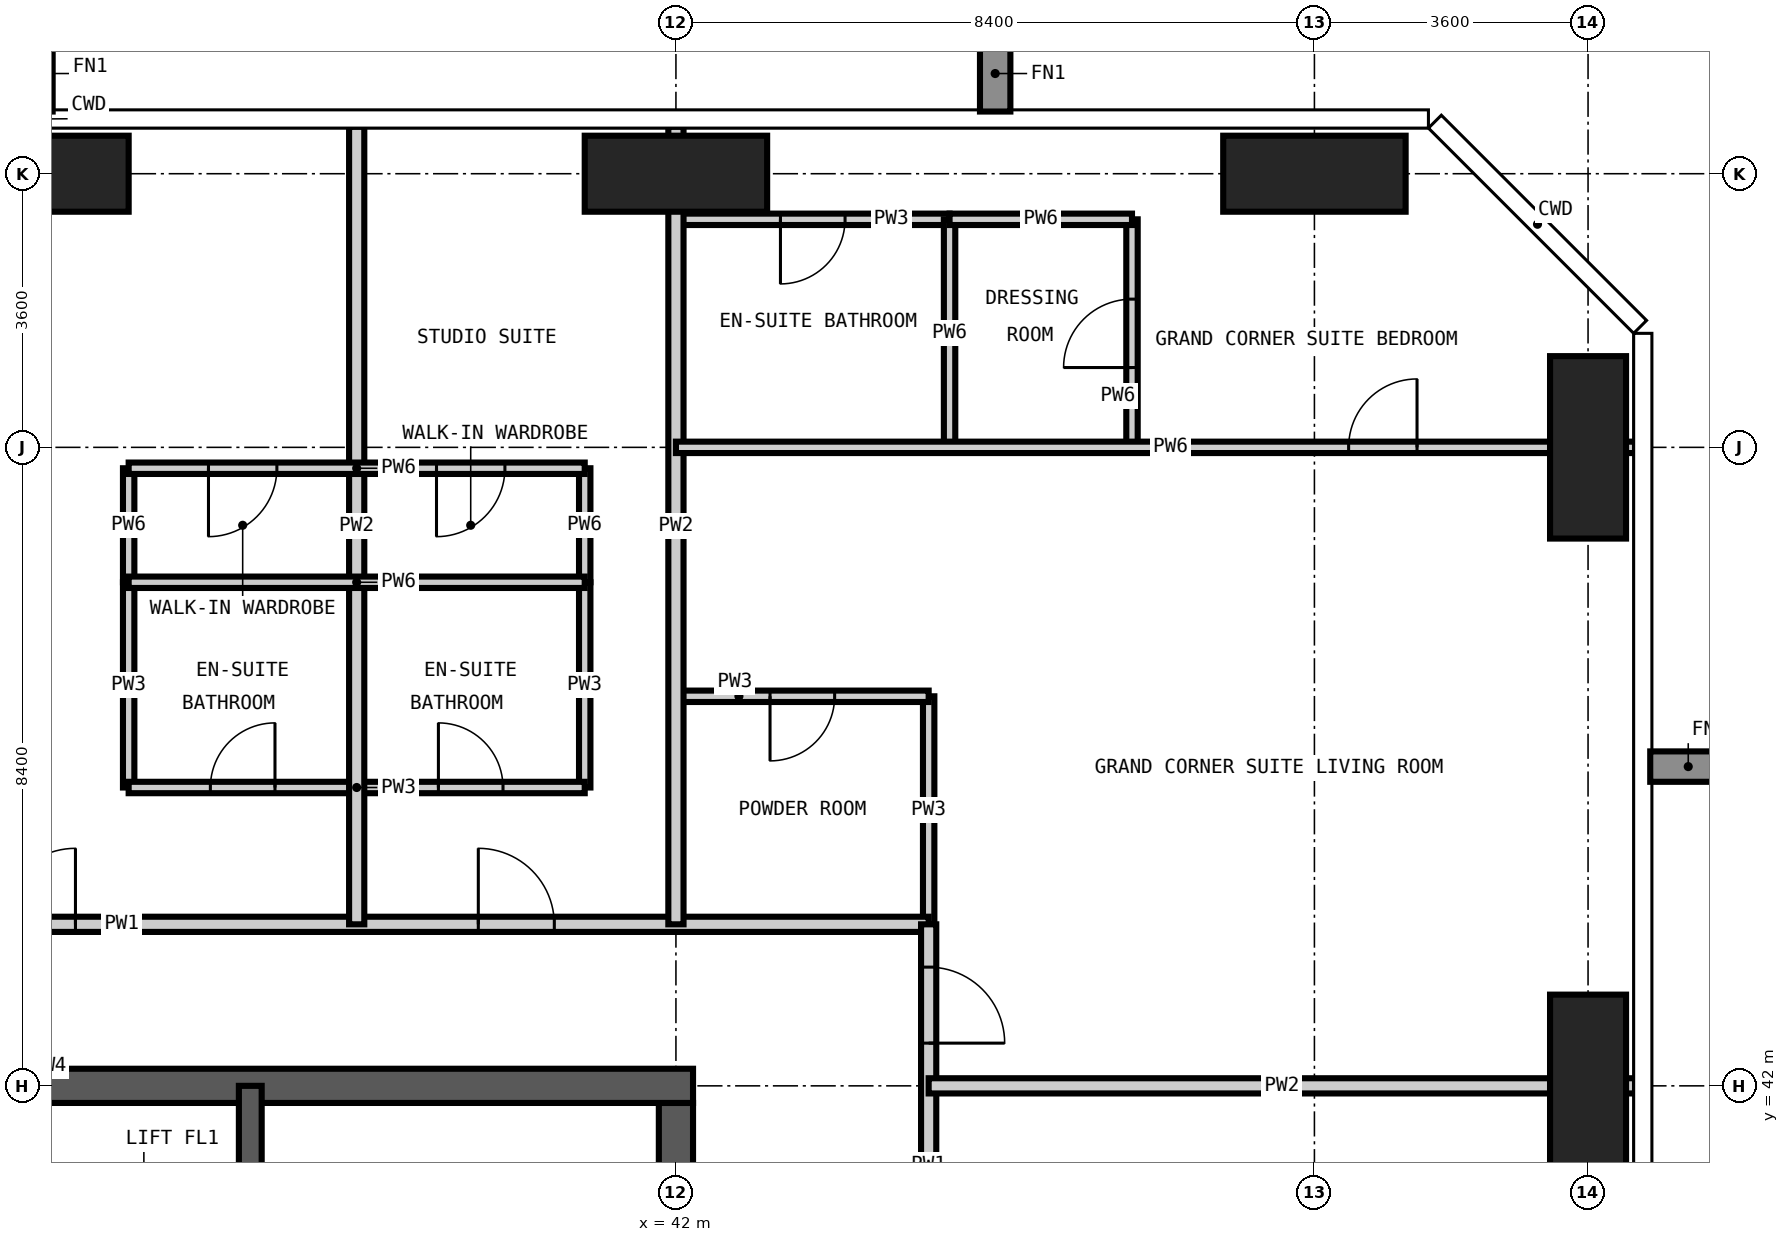
"""IFC4 building model, lengths in metres.
Left out: names, types, materials, properties, quantities, classifications, styles, units other than length and angle.
Written with IfcOpenShell. Run it as: python <this file> out.ifc"""

import sys

from ifc_helpers import new_model, si_unit, direction, frame, frame_2d, origin, origin_2d, place, context, subcontext, project, spatial, rectangle, extrude, element, fill, save


model = new_model("IFC4")
c1 = context("Model", 3, precision=1e-05, world=origin(), true_north=direction((0.0, 1.0)))
c2 = subcontext(c1, "Body", "Model", "MODEL_VIEW")
j1 = project(units=[si_unit("LENGTHUNIT", "METRE"), si_unit("PLANEANGLEUNIT", "RADIAN")], contexts=[c1])
p1 = place(None, origin())
s1 = spatial("IfcSite", under=j1, at=p1, CompositionType="ELEMENT")
p2 = place(p1, origin())
s2 = spatial("IfcBuilding", under=s1, at=p2, CompositionType="ELEMENT")
p3 = place(p2, frame((0.0, 0.0, 264.6)))
s3 = spatial("IfcBuildingStorey", under=s2, at=p3, CompositionType="ELEMENT", Elevation=264.6)
for number, where, z_axis, x_axis in (
    (1, (33.6, 54.0, -0.35), (0.0, 0.0, 1.0), (1.0, 0.0, 0.0)),
    (2, (42.0, 54.0, -0.35), (0.0, 0.0, 1.0), (1.0, 0.0, 0.0)),
    (3, (50.4, 54.0, -0.35), (0.0, 0.0, 1.0), (1.0, 0.0, 0.0)),
):
    element("IfcColumn", number, at=place(p3, frame(where, z_axis=z_axis, x_axis=x_axis)), inside=s3, PredefinedType="COLUMN", context=c2, shape_type="SweptSolid", body=[
        extrude(rectangle(XDim=2.4, YDim=1.0, at=origin_2d()), origin(), (0.0, 0.0, 1.0), 3.9),
    ])
for number, where, z_axis, x_axis in (
    (4, (54.0, 42.0, -0.35), (0.0, 0.0, 1.0), (1.0, 0.0, 0.0)),
    (5, (54.0, 50.4, -0.35), (0.0, 0.0, 1.0), (1.0, 0.0, 0.0)),
):
    element("IfcColumn", number, at=place(p3, frame(where, z_axis=z_axis, x_axis=x_axis)), inside=s3, PredefinedType="COLUMN", context=c2, shape_type="SweptSolid", body=[
        extrude(rectangle(XDim=1.0, YDim=2.4, at=origin_2d()), origin(), (0.0, 0.0, 1.0), 3.9),
    ])
p4 = place(p3, frame((42.0, 17.025, -0.35), z_axis=(0.0, 0.0, 1.0), x_axis=(0.0, 1.0, 0.0)))
e6 = element("IfcWall", 6, at=p4, inside=s3, PredefinedType="SHEAR", context=c2, shape_type="SweptSolid", body=[
    extrude(rectangle(XDim=24.75, YDim=0.45, at=frame_2d((12.375, 0.0))), origin(), (0.0, 0.0, 1.0), 3.9),
])
p5 = place(p4, frame((0.575, 0.0, 0.35)))
e7 = element("IfcOpeningElement", 7, at=p5, cuts=e6, PredefinedType="OPENING", context=c2, shape_type="SweptSolid", body=[
    extrude(rectangle(XDim=1.2, YDim=2.2, at=frame_2d((0.6, 1.1))), frame((0.0, 0.235, 0.0), z_axis=(0.0, -1.0, 0.0), x_axis=(1.0, 0.0, 0.0)), (0.0, 0.0, 1.0), 0.47),
])
p6 = place(p4, frame((11.475, 0.0, 0.35)))
e8 = element("IfcOpeningElement", 8, at=p6, cuts=e6, PredefinedType="OPENING", context=c2, shape_type="SweptSolid", body=[
    extrude(rectangle(XDim=1.8, YDim=2.2, at=frame_2d((0.9, 1.1))), frame((0.0, 0.235, 0.0), z_axis=(0.0, -1.0, 0.0), x_axis=(1.0, 0.0, 0.0)), (0.0, 0.0, 1.0), 0.47),
])
p7 = place(p4, frame((20.275, 0.0, 0.35)))
e9 = element("IfcOpeningElement", 9, at=p7, cuts=e6, PredefinedType="OPENING", context=c2, shape_type="SweptSolid", body=[
    extrude(rectangle(XDim=1.0, YDim=2.1, at=frame_2d((0.5, 1.05))), frame((0.0, 0.235, 0.0), z_axis=(0.0, -1.0, 0.0), x_axis=(1.0, 0.0, 0.0)), (0.0, 0.0, 1.0), 0.47),
])
p8 = place(p3, frame((42.225, 42.0, -0.35), z_axis=(0.0, 0.0, 1.0), x_axis=(-1.0, 0.0, 0.0)))
e10 = element("IfcWall", 10, at=p8, inside=s3, PredefinedType="SHEAR", context=c2, shape_type="SweptSolid", body=[
    extrude(rectangle(XDim=17.25, YDim=0.45, at=frame_2d((8.625, 0.0))), origin(), (0.0, 0.0, 1.0), 3.9),
])
p9 = place(p8, frame((10.125, 0.0, 0.35)))
e11 = element("IfcOpeningElement", 11, at=p9, cuts=e10, PredefinedType="OPENING", context=c2, shape_type="SweptSolid", body=[
    extrude(rectangle(XDim=1.2, YDim=2.2, at=frame_2d((0.6, 1.1))), frame((0.0, 0.235, 0.0), z_axis=(0.0, -1.0, 0.0), x_axis=(1.0, 0.0, 0.0)), (0.0, 0.0, 1.0), 0.47),
])
p10 = place(p3, frame((36.4, 33.6, -0.35), z_axis=(0.0, 0.0, 1.0), x_axis=(0.0, 1.0, 0.0)))
e12 = element("IfcWall", 12, at=p10, inside=s3, PredefinedType="SHEAR", context=c2, shape_type="SweptSolid", body=[
    extrude(rectangle(XDim=8.4, YDim=0.3, at=frame_2d((4.2, 0.0))), origin(), (0.0, 0.0, 1.0), 3.9),
])
for number, where, z_axis, x_axis in (
    (13, (34.8, 45.925, 0.0), (0.0, 0.0, 1.0), (0.0, 1.0, 0.0)),
    (14, (40.8, 45.925, 0.0), (0.0, 0.0, 1.0), (0.0, 1.0, 0.0)),
):
    element("IfcWall", number, at=place(p3, frame(where, z_axis=z_axis, x_axis=x_axis)), inside=s3, PredefinedType="PARTITIONING", context=c2, shape_type="SweptSolid", body=[
        extrude(rectangle(XDim=2.7, YDim=0.15, at=frame_2d((1.35, 0.0))), origin(), (0.0, 0.0, 1.0), 3.55),
    ])
p11 = place(p3, frame((45.325, 44.125, 0.0), z_axis=(0.0, 0.0, 1.0), x_axis=(0.0, 1.0, 0.0)))
e15 = element("IfcWall", 15, at=p11, inside=s3, PredefinedType="PARTITIONING", context=c2, shape_type="SweptSolid", body=[
    extrude(rectangle(XDim=3.0, YDim=0.15, at=frame_2d((1.5, 0.0))), origin(), (0.0, 0.0, 1.0), 3.55),
])
p12 = place(p3, frame((34.8, 45.925, 0.0), z_axis=(0.0, 0.0, 1.0), x_axis=(1.0, 0.0, 0.0)))
e16 = element("IfcWall", 16, at=p12, inside=s3, PredefinedType="PARTITIONING", context=c2, shape_type="SweptSolid", body=[
    extrude(rectangle(XDim=6.0, YDim=0.15, at=frame_2d((3.0, 0.0))), origin(), (0.0, 0.0, 1.0), 3.55),
])
p13 = place(p12, frame((1.075, 0.0, 0.0)))
e17 = element("IfcOpeningElement", 17, at=p13, cuts=e16, PredefinedType="OPENING", context=c2, shape_type="SweptSolid", body=[
    extrude(rectangle(XDim=0.85, YDim=2.1, at=frame_2d((0.425, 1.05))), frame((0.0, 0.085, 0.0), z_axis=(0.0, -1.0, 0.0), x_axis=(1.0, 0.0, 0.0)), (0.0, 0.0, 1.0), 0.17),
])
p14 = place(p12, frame((4.075, 0.0, 0.0)))
e18 = element("IfcOpeningElement", 18, at=p14, cuts=e16, PredefinedType="OPENING", context=c2, shape_type="SweptSolid", body=[
    extrude(rectangle(XDim=0.85, YDim=2.1, at=frame_2d((0.425, 1.05))), frame((0.0, 0.085, 0.0), z_axis=(0.0, -1.0, 0.0), x_axis=(1.0, 0.0, 0.0)), (0.0, 0.0, 1.0), 0.17),
])
p15 = place(p3, frame((42.0, 47.125, 0.0), z_axis=(0.0, 0.0, 1.0), x_axis=(1.0, 0.0, 0.0)))
e19 = element("IfcWall", 19, at=p15, inside=s3, PredefinedType="PARTITIONING", context=c2, shape_type="SweptSolid", body=[
    extrude(rectangle(XDim=3.325, YDim=0.15, at=frame_2d((1.663, 0.0))), origin(), (0.0, 0.0, 1.0), 3.55),
])
p16 = place(p15, frame((1.238, 0.0, 0.0)))
e20 = element("IfcOpeningElement", 20, at=p16, cuts=e19, PredefinedType="OPENING", context=c2, shape_type="SweptSolid", body=[
    extrude(rectangle(XDim=0.85, YDim=2.1, at=frame_2d((0.425, 1.05))), frame((0.0, 0.085, 0.0), z_axis=(0.0, -1.0, 0.0), x_axis=(1.0, 0.0, 0.0)), (0.0, 0.0, 1.0), 0.17),
])
p17 = place(p3, frame((42.0, 53.4, 0.0), z_axis=(0.0, 0.0, 1.0), x_axis=(1.0, 0.0, 0.0)))
e21 = element("IfcWall", 21, at=p17, inside=s3, PredefinedType="PARTITIONING", context=c2, shape_type="SweptSolid", body=[
    extrude(rectangle(XDim=3.6, YDim=0.15, at=frame_2d((1.8, 0.0))), origin(), (0.0, 0.0, 1.0), 3.55),
])
p18 = place(p17, frame((1.375, 0.0, 0.0)))
e22 = element("IfcOpeningElement", 22, at=p18, cuts=e21, PredefinedType="OPENING", context=c2, shape_type="SweptSolid", body=[
    extrude(rectangle(XDim=0.85, YDim=2.1, at=frame_2d((0.425, 1.05))), frame((0.0, 0.085, 0.0), z_axis=(0.0, -1.0, 0.0), x_axis=(1.0, 0.0, 0.0)), (0.0, 0.0, 1.0), 0.17),
])
p19 = place(p3, frame((22.475, 44.125, 0.0), z_axis=(0.0, 0.0, 1.0), x_axis=(1.0, 0.0, 0.0)))
e23 = element("IfcWall", 23, at=p19, inside=s3, PredefinedType="PARTITIONING", context=c2, shape_type="SweptSolid", body=[
    extrude(rectangle(XDim=22.85, YDim=0.2, at=frame_2d((11.425, 0.0))), origin(), (0.0, 0.0, 1.0), 3.55),
])
p20 = place(p19, frame((4.325, 0.0, 0.0)))
e24 = element("IfcOpeningElement", 24, at=p20, cuts=e23, PredefinedType="OPENING", context=c2, shape_type="SweptSolid", body=[
    extrude(rectangle(XDim=1.0, YDim=2.2, at=frame_2d((0.5, 1.1))), frame((0.0, 0.11, 0.0), z_axis=(0.0, -1.0, 0.0), x_axis=(1.0, 0.0, 0.0)), (0.0, 0.0, 1.0), 0.22),
])
p21 = place(p19, frame((10.625, 0.0, 0.0)))
e25 = element("IfcOpeningElement", 25, at=p21, cuts=e23, PredefinedType="OPENING", context=c2, shape_type="SweptSolid", body=[
    extrude(rectangle(XDim=1.0, YDim=2.2, at=frame_2d((0.5, 1.1))), frame((0.0, 0.11, 0.0), z_axis=(0.0, -1.0, 0.0), x_axis=(1.0, 0.0, 0.0)), (0.0, 0.0, 1.0), 0.22),
])
p22 = place(p19, frame((16.925, 0.0, 0.0)))
e26 = element("IfcOpeningElement", 26, at=p22, cuts=e23, PredefinedType="OPENING", context=c2, shape_type="SweptSolid", body=[
    extrude(rectangle(XDim=1.0, YDim=2.2, at=frame_2d((0.5, 1.1))), frame((0.0, 0.11, 0.0), z_axis=(0.0, -1.0, 0.0), x_axis=(1.0, 0.0, 0.0)), (0.0, 0.0, 1.0), 0.22),
])
p23 = place(p3, frame((45.325, 44.125, 0.0), z_axis=(0.0, 0.0, 1.0), x_axis=(0.0, -1.0, 0.0)))
e27 = element("IfcWall", 27, at=p23, inside=s3, PredefinedType="PARTITIONING", context=c2, shape_type="SweptSolid", body=[
    extrude(rectangle(XDim=6.325, YDim=0.2, at=frame_2d((3.163, 0.0))), origin(), (0.0, 0.0, 1.0), 3.55),
])
p24 = place(p23, frame((3.725, 0.0, 0.0)))
e28 = element("IfcOpeningElement", 28, at=p24, cuts=e27, PredefinedType="OPENING", context=c2, shape_type="SweptSolid", body=[
    extrude(rectangle(XDim=1.0, YDim=2.2, at=frame_2d((0.5, 1.1))), frame((0.0, 0.11, 0.0), z_axis=(0.0, -1.0, 0.0), x_axis=(1.0, 0.0, 0.0)), (0.0, 0.0, 1.0), 0.22),
])
p25 = place(p23, frame((0.563, 0.0, 0.0)))
e29 = element("IfcOpeningElement", 29, at=p25, cuts=e27, PredefinedType="OPENING", context=c2, shape_type="SweptSolid", body=[
    extrude(rectangle(XDim=1.0, YDim=2.2, at=frame_2d((0.5, 1.1))), frame((0.0, 0.11, 0.0), z_axis=(0.0, -1.0, 0.0), x_axis=(1.0, 0.0, 0.0)), (0.0, 0.0, 1.0), 0.22),
])
for number, where, z_axis, x_axis in (
    (30, (37.8, 44.125, 0.0), (0.0, 0.0, 1.0), (0.0, 1.0, 0.0)),
    (31, (42.0, 44.125, 0.0), (0.0, 0.0, 1.0), (0.0, 1.0, 0.0)),
):
    element("IfcWall", number, at=place(p3, frame(where, z_axis=z_axis, x_axis=x_axis)), inside=s3, PredefinedType="PARTITIONING", context=c2, shape_type="SweptSolid", body=[
        extrude(rectangle(XDim=10.493, YDim=0.2, at=frame_2d((5.247, 0.0))), origin(), (0.0, 0.0, 1.0), 3.55),
    ])
p26 = place(p3, frame((45.325, 42.0, 0.0), z_axis=(0.0, 0.0, 1.0), x_axis=(1.0, 0.0, 0.0)))
e32 = element("IfcWall", 32, at=p26, inside=s3, PredefinedType="PARTITIONING", context=c2, shape_type="SweptSolid", body=[
    extrude(rectangle(XDim=9.293, YDim=0.2, at=frame_2d((4.646, 0.0))), origin(), (0.0, 0.0, 1.0), 3.55),
])
for number, where, z_axis, x_axis in (
    (33, (34.8, 48.625, 0.0), (0.0, 0.0, 1.0), (0.0, 1.0, 0.0)),
    (34, (40.8, 48.625, 0.0), (0.0, 0.0, 1.0), (0.0, 1.0, 0.0)),
):
    element("IfcWall", number, at=place(p3, frame(where, z_axis=z_axis, x_axis=x_axis)), inside=s3, PredefinedType="PARTITIONING", context=c2, shape_type="SweptSolid", body=[
        extrude(rectangle(XDim=1.5, YDim=0.15, at=frame_2d((0.75, 0.0))), origin(), (0.0, 0.0, 1.0), 3.55),
    ])
p27 = place(p3, frame((45.6, 50.4, 0.0), z_axis=(0.0, 0.0, 1.0), x_axis=(0.0, 1.0, 0.0)))
e35 = element("IfcWall", 35, at=p27, inside=s3, PredefinedType="PARTITIONING", context=c2, shape_type="SweptSolid", body=[
    extrude(rectangle(XDim=3.0, YDim=0.15, at=frame_2d((1.5, 0.0))), origin(), (0.0, 0.0, 1.0), 3.55),
])
p28 = place(p3, frame((48.0, 50.4, 0.0), z_axis=(0.0, 0.0, 1.0), x_axis=(0.0, 1.0, 0.0)))
e36 = element("IfcWall", 36, at=p28, inside=s3, PredefinedType="PARTITIONING", context=c2, shape_type="SweptSolid", body=[
    extrude(rectangle(XDim=3.0, YDim=0.15, at=frame_2d((1.5, 0.0))), origin(), (0.0, 0.0, 1.0), 3.55),
])
p29 = place(p28, frame((1.05, 0.0, 0.0)))
e37 = element("IfcOpeningElement", 37, at=p29, cuts=e36, PredefinedType="OPENING", context=c2, shape_type="SweptSolid", body=[
    extrude(rectangle(XDim=0.9, YDim=2.1, at=frame_2d((0.45, 1.05))), frame((0.0, 0.085, 0.0), z_axis=(0.0, -1.0, 0.0), x_axis=(1.0, 0.0, 0.0)), (0.0, 0.0, 1.0), 0.17),
])
p30 = place(p3, frame((34.8, 48.625, 0.0), z_axis=(0.0, 0.0, 1.0), x_axis=(1.0, 0.0, 0.0)))
e38 = element("IfcWall", 38, at=p30, inside=s3, PredefinedType="PARTITIONING", context=c2, shape_type="SweptSolid", body=[
    extrude(rectangle(XDim=6.0, YDim=0.15, at=frame_2d((3.0, 0.0))), origin(), (0.0, 0.0, 1.0), 3.55),
])
p31 = place(p3, frame((34.8, 50.125, 0.0), z_axis=(0.0, 0.0, 1.0), x_axis=(1.0, 0.0, 0.0)))
e39 = element("IfcWall", 39, at=p31, inside=s3, PredefinedType="PARTITIONING", context=c2, shape_type="SweptSolid", body=[
    extrude(rectangle(XDim=6.0, YDim=0.15, at=frame_2d((3.0, 0.0))), origin(), (0.0, 0.0, 1.0), 3.55),
])
p32 = place(p31, frame((1.05, 0.0, 0.0)))
e40 = element("IfcOpeningElement", 40, at=p32, cuts=e39, PredefinedType="OPENING", context=c2, shape_type="SweptSolid", body=[
    extrude(rectangle(XDim=0.9, YDim=2.1, at=frame_2d((0.45, 1.05))), frame((0.0, 0.085, 0.0), z_axis=(0.0, -1.0, 0.0), x_axis=(1.0, 0.0, 0.0)), (0.0, 0.0, 1.0), 0.17),
])
p33 = place(p31, frame((4.05, 0.0, 0.0)))
e41 = element("IfcOpeningElement", 41, at=p33, cuts=e39, PredefinedType="OPENING", context=c2, shape_type="SweptSolid", body=[
    extrude(rectangle(XDim=0.9, YDim=2.1, at=frame_2d((0.45, 1.05))), frame((0.0, 0.085, 0.0), z_axis=(0.0, -1.0, 0.0), x_axis=(1.0, 0.0, 0.0)), (0.0, 0.0, 1.0), 0.17),
])
p34 = place(p3, frame((42.0, 50.4, 0.0), z_axis=(0.0, 0.0, 1.0), x_axis=(1.0, 0.0, 0.0)))
e42 = element("IfcWall", 42, at=p34, inside=s3, PredefinedType="PARTITIONING", context=c2, shape_type="SweptSolid", body=[
    extrude(rectangle(XDim=12.618, YDim=0.15, at=frame_2d((6.309, 0.0))), origin(), (0.0, 0.0, 1.0), 3.55),
])
p35 = place(p34, frame((8.85, 0.0, 0.0)))
e43 = element("IfcOpeningElement", 43, at=p35, cuts=e42, PredefinedType="OPENING", context=c2, shape_type="SweptSolid", body=[
    extrude(rectangle(XDim=0.9, YDim=2.1, at=frame_2d((0.45, 1.05))), frame((0.0, 0.085, 0.0), z_axis=(0.0, -1.0, 0.0), x_axis=(1.0, 0.0, 0.0)), (0.0, 0.0, 1.0), 0.17),
])
p36 = place(p3, frame((45.6, 53.4, 0.0), z_axis=(0.0, 0.0, 1.0), x_axis=(1.0, 0.0, 0.0)))
e44 = element("IfcWall", 44, at=p36, inside=s3, PredefinedType="PARTITIONING", context=c2, shape_type="SweptSolid", body=[
    extrude(rectangle(XDim=2.4, YDim=0.15, at=frame_2d((1.2, 0.0))), origin(), (0.0, 0.0, 1.0), 3.55),
])
p37 = place(p21, origin())
e45 = element("IfcDoor", 45, at=p37, inside=s3, OperationType="SINGLE_SWING_RIGHT", PredefinedType="DOOR", context=c2, shape_type="SweptSolid", body=[
    extrude(rectangle(XDim=1.0, YDim=2.2, at=frame_2d((0.5, 1.1))), frame((0.0, 0.025, 0.0), z_axis=(0.0, -1.0, 0.0), x_axis=(1.0, 0.0, 0.0)), (0.0, 0.0, 1.0), 0.05),
])
fill(e25, e45)
p38 = place(p13, origin())
e46 = element("IfcDoor", 46, at=p38, inside=s3, OperationType="SINGLE_SWING_RIGHT", PredefinedType="DOOR", context=c2, shape_type="SweptSolid", body=[
    extrude(rectangle(XDim=0.85, YDim=2.1, at=frame_2d((0.425, 1.05))), frame((0.0, 0.025, 0.0), z_axis=(0.0, -1.0, 0.0), x_axis=(1.0, 0.0, 0.0)), (0.0, 0.0, 1.0), 0.05),
])
fill(e17, e46)
p39 = place(p32, frame((0.9, 0.0, 0.0), z_axis=(0.0, 0.0, 1.0), x_axis=(-1.0, 0.0, 0.0)))
e47 = element("IfcDoor", 47, at=p39, inside=s3, OperationType="SINGLE_SWING_RIGHT", PredefinedType="DOOR", context=c2, shape_type="SweptSolid", body=[
    extrude(rectangle(XDim=0.9, YDim=2.1, at=frame_2d((0.45, 1.05))), frame((0.0, 0.025, 0.0), z_axis=(0.0, -1.0, 0.0), x_axis=(1.0, 0.0, 0.0)), (0.0, 0.0, 1.0), 0.05),
])
fill(e40, e47)
p40 = place(p22, origin())
e48 = element("IfcDoor", 48, at=p40, inside=s3, OperationType="SINGLE_SWING_LEFT", PredefinedType="DOOR", context=c2, shape_type="SweptSolid", body=[
    extrude(rectangle(XDim=1.0, YDim=2.2, at=frame_2d((0.5, 1.1))), frame((0.0, 0.025, 0.0), z_axis=(0.0, -1.0, 0.0), x_axis=(1.0, 0.0, 0.0)), (0.0, 0.0, 1.0), 0.05),
])
fill(e26, e48)
p41 = place(p14, origin())
e49 = element("IfcDoor", 49, at=p41, inside=s3, OperationType="SINGLE_SWING_LEFT", PredefinedType="DOOR", context=c2, shape_type="SweptSolid", body=[
    extrude(rectangle(XDim=0.85, YDim=2.1, at=frame_2d((0.425, 1.05))), frame((0.0, 0.025, 0.0), z_axis=(0.0, -1.0, 0.0), x_axis=(1.0, 0.0, 0.0)), (0.0, 0.0, 1.0), 0.05),
])
fill(e18, e49)
p42 = place(p33, frame((0.9, 0.0, 0.0), z_axis=(0.0, 0.0, 1.0), x_axis=(-1.0, 0.0, 0.0)))
e50 = element("IfcDoor", 50, at=p42, inside=s3, OperationType="SINGLE_SWING_RIGHT", PredefinedType="DOOR", context=c2, shape_type="SweptSolid", body=[
    extrude(rectangle(XDim=0.9, YDim=2.1, at=frame_2d((0.45, 1.05))), frame((0.0, 0.025, 0.0), z_axis=(0.0, -1.0, 0.0), x_axis=(1.0, 0.0, 0.0)), (0.0, 0.0, 1.0), 0.05),
])
fill(e41, e50)
p43 = place(p25, origin())
e51 = element("IfcDoor", 51, at=p43, inside=s3, OperationType="SINGLE_SWING_RIGHT", PredefinedType="DOOR", context=c2, shape_type="SweptSolid", body=[
    extrude(rectangle(XDim=1.0, YDim=2.2, at=frame_2d((0.5, 1.1))), frame((0.0, 0.025, 0.0), z_axis=(0.0, -1.0, 0.0), x_axis=(1.0, 0.0, 0.0)), (0.0, 0.0, 1.0), 0.05),
])
fill(e29, e51)
p44 = place(p16, frame((0.85, 0.0, 0.0), z_axis=(0.0, 0.0, 1.0), x_axis=(-1.0, 0.0, 0.0)))
e52 = element("IfcDoor", 52, at=p44, inside=s3, OperationType="SINGLE_SWING_RIGHT", PredefinedType="DOOR", context=c2, shape_type="SweptSolid", body=[
    extrude(rectangle(XDim=0.85, YDim=2.1, at=frame_2d((0.425, 1.05))), frame((0.0, 0.025, 0.0), z_axis=(0.0, -1.0, 0.0), x_axis=(1.0, 0.0, 0.0)), (0.0, 0.0, 1.0), 0.05),
])
fill(e20, e52)
p45 = place(p35, origin())
e53 = element("IfcDoor", 53, at=p45, inside=s3, OperationType="SINGLE_SWING_RIGHT", PredefinedType="DOOR", context=c2, shape_type="SweptSolid", body=[
    extrude(rectangle(XDim=0.9, YDim=2.1, at=frame_2d((0.45, 1.05))), frame((0.0, 0.025, 0.0), z_axis=(0.0, -1.0, 0.0), x_axis=(1.0, 0.0, 0.0)), (0.0, 0.0, 1.0), 0.05),
])
fill(e43, e53)
p46 = place(p18, frame((0.85, 0.0, 0.0), z_axis=(0.0, 0.0, 1.0), x_axis=(-1.0, 0.0, 0.0)))
e54 = element("IfcDoor", 54, at=p46, inside=s3, OperationType="SINGLE_SWING_RIGHT", PredefinedType="DOOR", context=c2, shape_type="SweptSolid", body=[
    extrude(rectangle(XDim=0.85, YDim=2.1, at=frame_2d((0.425, 1.05))), frame((0.0, 0.025, 0.0), z_axis=(0.0, -1.0, 0.0), x_axis=(1.0, 0.0, 0.0)), (0.0, 0.0, 1.0), 0.05),
])
fill(e22, e54)
p47 = place(p29, origin())
e55 = element("IfcDoor", 55, at=p47, inside=s3, OperationType="SINGLE_SWING_LEFT", PredefinedType="DOOR", context=c2, shape_type="SweptSolid", body=[
    extrude(rectangle(XDim=0.9, YDim=2.1, at=frame_2d((0.45, 1.05))), frame((0.0, 0.025, 0.0), z_axis=(0.0, -1.0, 0.0), x_axis=(1.0, 0.0, 0.0)), (0.0, 0.0, 1.0), 0.05),
])
fill(e37, e55)
save(model, sys.argv[1])
